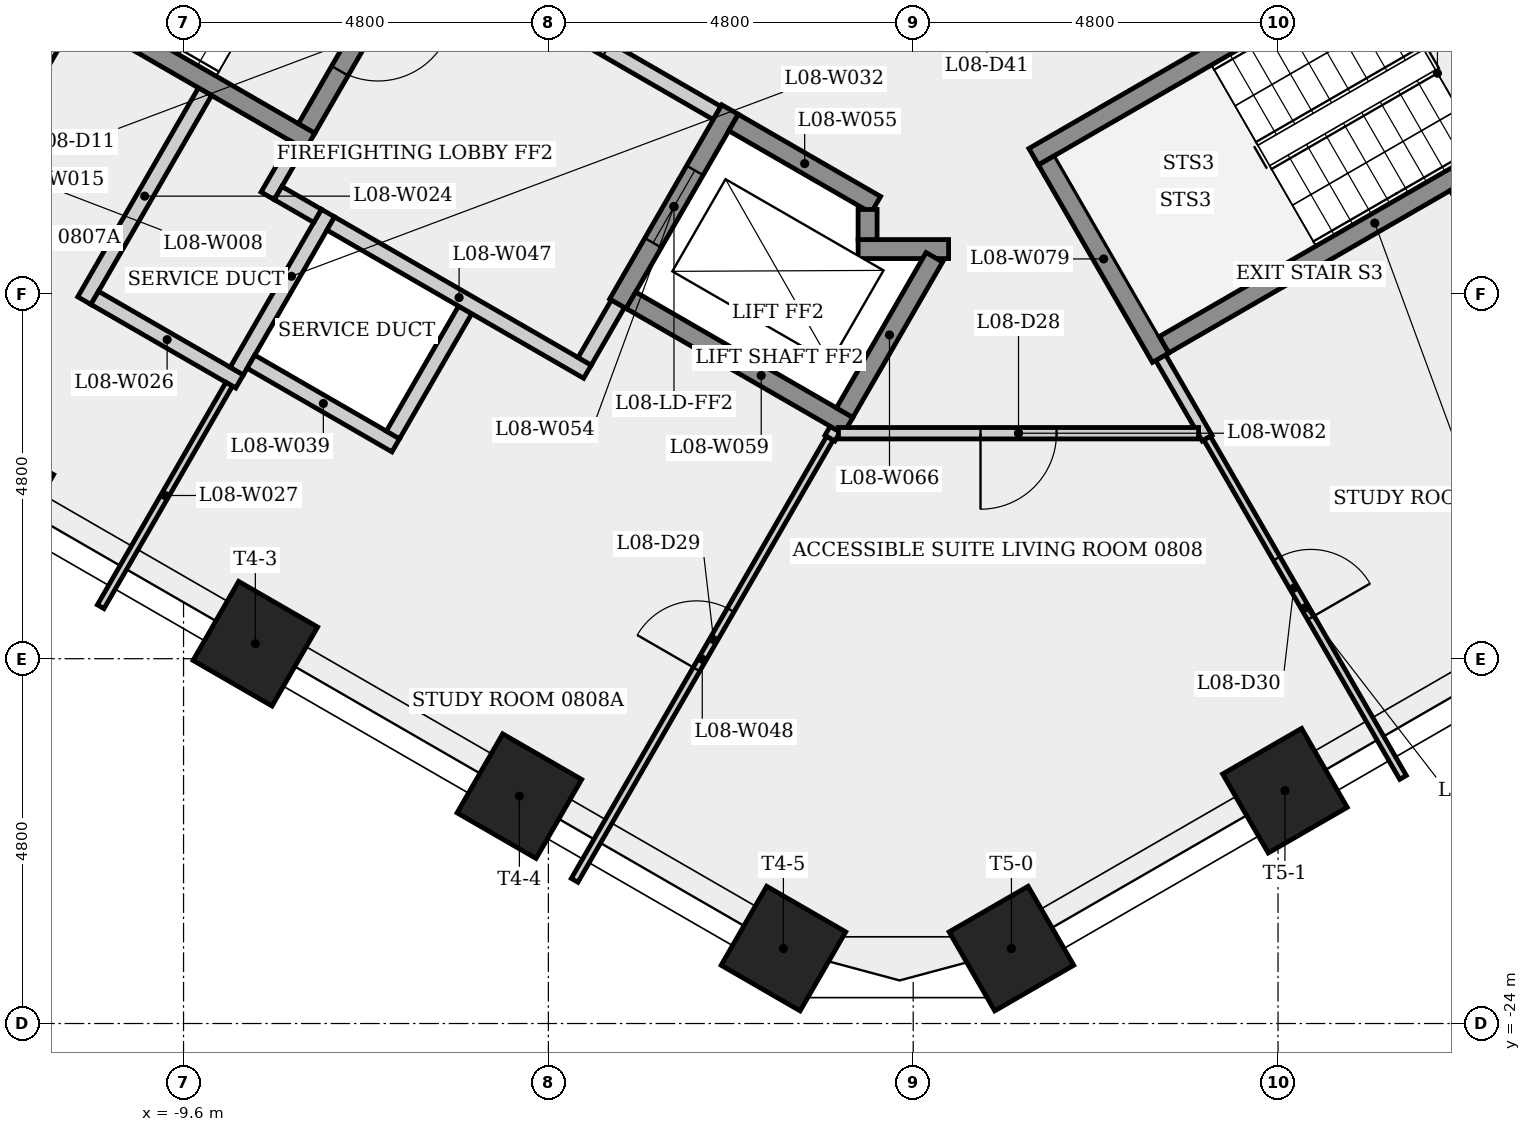
"""IFC4 building model, lengths in metres.
Left out: names, types, materials, properties, quantities, classifications, styles, units other than length and angle.
Written with IfcOpenShell. Run it as: python <this file> out.ifc"""

import sys

from ifc_helpers import new_model, si_unit, direction, frame, frame_2d, origin, origin_2d, place, context, subcontext, project, spatial, rectangle, extrude, element, fill, save


model = new_model("IFC4")
c1 = context("Model", 3, precision=1e-05, world=origin(), true_north=direction((0.0, 1.0)))
c2 = subcontext(c1, "Body", "Model", "MODEL_VIEW")
j1 = project(units=[si_unit("LENGTHUNIT", "METRE"), si_unit("PLANEANGLEUNIT", "RADIAN")], contexts=[c1])
p1 = place(None, origin())
s1 = spatial("IfcSite", under=j1, at=p1, CompositionType="ELEMENT")
p2 = place(p1, origin())
s2 = spatial("IfcBuilding", under=s1, at=p2, CompositionType="ELEMENT")
p3 = place(p2, frame((0.0, 0.0, 35.7)))
s3 = spatial("IfcBuildingStorey", under=s2, at=p3, CompositionType="ELEMENT", Elevation=35.7)
for number, where, z_axis, x_axis in (
    (1, (-12.129, -16.997, 0.0), (0.0, 0.0, 1.0), (-0.5, -0.866, 0.0)),
    (2, (-8.655, -19.003, 0.0), (0.0, 0.0, 1.0), (-0.5, -0.866, 0.0)),
    (3, (-5.182, -21.009, 0.0), (0.0, 0.0, 1.0), (-0.5, -0.866, 0.0)),
    (4, (-1.708, -23.014, 0.0), (0.0, 0.0, 1.0), (-0.5, -0.866, 0.0)),
    (5, (1.292, -23.014, 0.0), (0.0, 0.0, 1.0), (0.5, -0.866, 0.0)),
    (6, (4.891, -20.937, 0.0), (0.0, 0.0, 1.0), (0.5, -0.866, 0.0)),
):
    element("IfcColumn", number, at=place(p3, frame(where, z_axis=z_axis, x_axis=x_axis)), inside=s3, PredefinedType="COLUMN", context=c2, shape_type="SweptSolid", body=[
        extrude(rectangle(XDim=1.2, YDim=1.2, at=origin_2d()), origin(), (0.0, 0.0, 1.0), 3.4),
    ])
p4 = place(p3, frame((-12.262, -12.839, 0.0), z_axis=(0.0, 0.0, 1.0), x_axis=(0.499972286653, 0.866041403502, 0.0)))
e7 = element("IfcWall", 7, at=p4, inside=s3, PredefinedType="PARTITIONING", context=c2, shape_type="SweptSolid", body=[
    extrude(rectangle(XDim=2.425, YDim=0.1, at=frame_2d((1.212, 0.0))), origin(), (0.0, 0.0, 1.0), 3.05),
])
p5 = place(p3, frame((-13.477, -9.193, 0.0), z_axis=(0.0, 0.0, 1.0), x_axis=(0.866025499775, -0.499999833739, 0.0)))
e8 = element("IfcWall", 8, at=p5, inside=s3, PredefinedType="SHEAR", context=c2, shape_type="SweptSolid", body=[
    extrude(rectangle(XDim=6.4, YDim=0.25, at=frame_2d((3.2, 0.0))), origin(), (0.0, 0.0, 1.0), 3.05),
])
p6 = place(p3, frame((-10.905, -14.489, 0.0), z_axis=(0.0, 0.0, 1.0), x_axis=(0.499959856469, 0.866048579423, 0.0)))
e9 = element("IfcWall", 9, at=p6, inside=s3, PredefinedType="PLUMBINGWALL", context=c2, shape_type="SweptSolid", body=[
    extrude(rectangle(XDim=3.175, YDim=0.2, at=frame_2d((1.587, 0.0))), origin(), (0.0, 0.0, 1.0), 3.05),
])
p7 = place(p3, frame((-8.863, -15.552, 0.0), z_axis=(0.0, 0.0, 1.0), x_axis=(-0.866035918664, 0.499981787252, 0.0)))
e10 = element("IfcWall", 10, at=p7, inside=s3, PredefinedType="PLUMBINGWALL", context=c2, shape_type="SweptSolid", body=[
    extrude(rectangle(XDim=2.2, YDim=0.2, at=frame_2d((1.1, 0.0))), origin(), (0.0, 0.0, 1.0), 3.05),
])
p8 = place(p3, frame((-9.0, -15.588, 0.0), z_axis=(0.0, 0.0, 1.0), x_axis=(-0.499968344795, -0.866043679154, 0.0)))
e11 = element("IfcWall", 11, at=p8, inside=s3, PredefinedType="PARTITIONING", context=c2, shape_type="SweptSolid", body=[
    extrude(rectangle(XDim=3.381, YDim=0.1, at=frame_2d((1.69, 0.0))), origin(), (0.0, 0.0, 1.0), 3.05),
])
p9 = place(p3, frame((-8.493, -13.11, 0.0), z_axis=(0.0, 0.0, 1.0), x_axis=(0.500067724834, 0.865986299303, 0.0)))
e12 = element("IfcWall", 12, at=p9, inside=s3, PredefinedType="PLUMBINGWALL", context=c2, shape_type="SweptSolid", body=[
    extrude(rectangle(XDim=0.775, YDim=0.2, at=frame_2d((0.388, 0.0))), origin(), (0.0, 0.0, 1.0), 3.05),
])
p10 = place(p3, frame((-7.7, -13.337, 0.0), z_axis=(0.0, 0.0, 1.0), x_axis=(-0.500001309137, -0.866024647952, 0.0)))
e13 = element("IfcWall", 13, at=p10, inside=s3, PredefinedType="PLUMBINGWALL", context=c2, shape_type="SweptSolid", body=[
    extrude(rectangle(XDim=2.4, YDim=0.2, at=frame_2d((1.2, 0.0))), origin(), (0.0, 0.0, 1.0), 3.05),
])
p11 = place(p3, frame((-7.836, -13.373, 0.0), z_axis=(0.0, 0.0, 1.0), x_axis=(-0.866232998003, 0.499640263761, 0.0)))
e14 = element("IfcWall", 14, at=p11, inside=s3, PredefinedType="PLUMBINGWALL", context=c2, shape_type="SweptSolid", body=[
    extrude(rectangle(XDim=0.6, YDim=0.2, at=frame_2d((0.3, 0.0))), origin(), (0.0, 0.0, 1.0), 3.05),
])
p12 = place(p3, frame((-6.808, -16.392, 0.0), z_axis=(0.0, 0.0, 1.0), x_axis=(-0.866008176907, 0.50002983664, 0.0)))
e15 = element("IfcWall", 15, at=p12, inside=s3, PredefinedType="PLUMBINGWALL", context=c2, shape_type="SweptSolid", body=[
    extrude(rectangle(XDim=2.2, YDim=0.2, at=frame_2d((1.1, 0.0))), origin(), (0.0, 0.0, 1.0), 3.05),
])
p13 = place(p3, frame((-6.605, -9.841, 0.0), z_axis=(0.0, 0.0, 1.0), x_axis=(-0.499996545922, -0.866027397988, 0.0)))
e16 = element("IfcWall", 16, at=p13, inside=s3, PredefinedType="SHEAR", context=c2, shape_type="SweptSolid", body=[
    extrude(rectangle(XDim=2.75, YDim=0.25, at=frame_2d((1.375, 0.0))), origin(), (0.0, 0.0, 1.0), 3.05),
])
p14 = place(p13, frame((0.875, 0.0, 0.0)))
e17 = element("IfcOpeningElement", 17, at=p14, cuts=e16, PredefinedType="OPENING", context=c2, shape_type="SweptSolid", body=[
    extrude(rectangle(XDim=1.0, YDim=2.1, at=frame_2d((0.5, 1.05))), frame((0.0, 0.135, 0.0), z_axis=(0.0, -1.0, 0.0), x_axis=(1.0, 0.0, 0.0)), (0.0, 0.0, 1.0), 0.27),
])
p15 = place(p3, frame((-6.435, -9.795, 0.0), z_axis=(0.0, 0.0, 1.0), x_axis=(0.866012907634, -0.500021643343, 0.0)))
e18 = element("IfcWall", 18, at=p15, inside=s3, PredefinedType="PARTITIONING", context=c2, shape_type="SweptSolid", body=[
    extrude(rectangle(XDim=4.45, YDim=0.2, at=frame_2d((2.225, 0.0))), origin(), (0.0, 0.0, 1.0), 3.05),
])
p16 = place(p15, frame((1.675, 0.0, 0.0)))
e19 = element("IfcOpeningElement", 19, at=p16, cuts=e18, PredefinedType="OPENING", context=c2, shape_type="SweptSolid", body=[
    extrude(rectangle(XDim=1.1, YDim=2.1, at=frame_2d((0.55, 1.05))), frame((0.0, 0.11, 0.0), z_axis=(0.0, -1.0, 0.0), x_axis=(1.0, 0.0, 0.0)), (0.0, 0.0, 1.0), 0.22),
])
p17 = place(p3, frame((-5.895, -14.61, 0.0), z_axis=(0.0, 0.0, 1.0), x_axis=(-0.500022797313, -0.86601224135, 0.0)))
e20 = element("IfcWall", 20, at=p17, inside=s3, PredefinedType="PLUMBINGWALL", context=c2, shape_type="SweptSolid", body=[
    extrude(rectangle(XDim=1.9, YDim=0.2, at=frame_2d((0.95, 0.0))), origin(), (0.0, 0.0, 1.0), 3.05),
])
p18 = place(p3, frame((-4.286, -15.423, 0.0), z_axis=(0.0, 0.0, 1.0), x_axis=(-0.866042777325, 0.499969906938, 0.0)))
e21 = element("IfcWall", 21, at=p18, inside=s3, PredefinedType="PARTITIONING", context=c2, shape_type="SweptSolid", body=[
    extrude(rectangle(XDim=3.9, YDim=0.2, at=frame_2d((1.95, 0.0))), origin(), (0.0, 0.0, 1.0), 3.05),
])
p19 = place(p3, frame((-4.455, -22.116, 0.0), z_axis=(0.0, 0.0, 1.0), x_axis=(0.500004517121, 0.866022795808, 0.0)))
e22 = element("IfcWall", 22, at=p19, inside=s3, PredefinedType="PARTITIONING", context=c2, shape_type="SweptSolid", body=[
    extrude(rectangle(XDim=6.718, YDim=0.1, at=frame_2d((3.359, 0.0))), origin(), (0.0, 0.0, 1.0), 3.05),
])
p20 = place(p19, frame((3.207, 0.0, 0.0)))
e23 = element("IfcOpeningElement", 23, at=p20, cuts=e22, PredefinedType="OPENING", context=c2, shape_type="SweptSolid", body=[
    extrude(rectangle(XDim=0.9, YDim=2.1, at=frame_2d((0.45, 1.05))), frame((0.0, 0.06, 0.0), z_axis=(0.0, -1.0, 0.0), x_axis=(1.0, 0.0, 0.0)), (0.0, 0.0, 1.0), 0.12),
])
p21 = place(p3, frame((-3.885, -14.529, 0.0), z_axis=(0.0, 0.0, 1.0), x_axis=(-0.499859285417, -0.866106630146, 0.0)))
e24 = element("IfcWall", 24, at=p21, inside=s3, PredefinedType="PARTITIONING", context=c2, shape_type="SweptSolid", body=[
    extrude(rectangle(XDim=0.875, YDim=0.2, at=frame_2d((0.438, 0.0))), origin(), (0.0, 0.0, 1.0), 3.05),
])
p22 = place(p3, frame((-2.41, -11.974, 0.0), z_axis=(0.0, 0.0, 1.0), x_axis=(-0.500001826776, -0.866024349092, 0.0)))
e25 = element("IfcWall", 25, at=p22, inside=s3, PredefinedType="SHEAR", context=c2, shape_type="SweptSolid", body=[
    extrude(rectangle(XDim=2.95, YDim=0.25, at=frame_2d((1.475, 0.0))), origin(), (0.0, 0.0, 1.0), 3.05),
])
p23 = place(p22, frame((0.925, 0.0, 0.0)))
e26 = element("IfcOpeningElement", 26, at=p23, cuts=e25, PredefinedType="OPENING", context=c2, shape_type="SweptSolid", body=[
    extrude(rectangle(XDim=1.1, YDim=2.1, at=frame_2d((0.55, 1.05))), frame((0.0, 0.135, 0.0), z_axis=(0.0, -1.0, 0.0), x_axis=(1.0, 0.0, 0.0)), (0.0, 0.0, 1.0), 0.27),
])
p24 = place(p3, frame((-2.364, -12.145, 0.0), z_axis=(0.0, 0.0, 1.0), x_axis=(0.86603892542, -0.499976579108, 0.0)))
e27 = element("IfcWall", 27, at=p24, inside=s3, PredefinedType="SHEAR", context=c2, shape_type="SweptSolid", body=[
    extrude(rectangle(XDim=2.162, YDim=0.25, at=frame_2d((1.081, 0.0))), origin(), (0.0, 0.0, 1.0), 3.05),
])
p25 = place(p3, frame((-1.096, -16.298, 0.0), z_axis=(0.0, 0.0, 1.0), x_axis=(0.499004859493, 0.866599186592, 0.0)))
e28 = element("IfcWall", 28, at=p25, inside=s3, PredefinedType="PARTITIONING", context=c2, shape_type="SweptSolid", body=[
    extrude(rectangle(XDim=0.137, YDim=0.15, at=frame_2d((0.069, 0.0))), origin(), (0.0, 0.0, 1.0), 3.05),
])
p26 = place(p3, frame((-0.856, -16.133, 0.0), z_axis=(0.0, 0.0, 1.0), x_axis=(-0.866021716278, 0.500006386895, 0.0)))
e29 = element("IfcWall", 29, at=p26, inside=s3, PredefinedType="SHEAR", context=c2, shape_type="SweptSolid", body=[
    extrude(rectangle(XDim=3.3, YDim=0.25, at=frame_2d((1.65, 0.0))), origin(), (0.0, 0.0, 1.0), 3.05),
])
p27 = place(p3, frame((-0.725, -13.81, 0.0), z_axis=(0.0, 0.0, 1.0), x_axis=(1.0, 0.0, 0.0)))
e30 = element("IfcWall", 30, at=p27, inside=s3, PredefinedType="SHEAR", context=c2, shape_type="SweptSolid", body=[
    extrude(rectangle(XDim=1.191, YDim=0.25, at=frame_2d((0.595, 0.0))), origin(), (0.0, 0.0, 1.0), 3.05),
])
p28 = place(p3, frame((-0.6, -13.289, 0.0), z_axis=(0.0, 0.0, 1.0), x_axis=(0.0, -1.0, 0.0)))
e31 = element("IfcWall", 31, at=p28, inside=s3, PredefinedType="SHEAR", context=c2, shape_type="SweptSolid", body=[
    extrude(rectangle(XDim=0.396, YDim=0.25, at=frame_2d((0.198, 0.0))), origin(), (0.0, 0.0, 1.0), 3.4),
])
p29 = place(p3, frame((0.278, -13.918, 0.0), z_axis=(0.0, 0.0, 1.0), x_axis=(-0.49998806882, -0.866032292145, 0.0)))
e32 = element("IfcWall", 32, at=p29, inside=s3, PredefinedType="SHEAR", context=c2, shape_type="SweptSolid", body=[
    extrude(rectangle(XDim=2.36, YDim=0.25, at=frame_2d((1.18, 0.0))), origin(), (0.0, 0.0, 1.0), 3.4),
])
p30 = place(p3, frame((1.585, -12.595, 0.0), z_axis=(0.0, 0.0, 1.0), x_axis=(0.866036417653, 0.499980922934, 0.0)))
e33 = element("IfcWall", 33, at=p30, inside=s3, PredefinedType="SHEAR", context=c2, shape_type="SweptSolid", body=[
    extrude(rectangle(XDim=6.65, YDim=0.25, at=frame_2d((3.325, 0.0))), origin(), (0.0, 0.0, 1.0), 3.05),
])
p31 = place(p30, frame((5.275, 0.0, 0.0)))
e34 = element("IfcOpeningElement", 34, at=p31, cuts=e33, PredefinedType="OPENING", context=c2, shape_type="SweptSolid", body=[
    extrude(rectangle(XDim=1.0, YDim=2.1, at=frame_2d((0.5, 1.05))), frame((0.0, 0.135, 0.0), z_axis=(0.0, -1.0, 0.0), x_axis=(1.0, 0.0, 0.0)), (0.0, 0.0, 1.0), 0.27),
])
p32 = place(p3, frame((3.256, -15.239, 0.0), z_axis=(0.0, 0.0, 1.0), x_axis=(0.499981614633, -0.866036018321, 0.0)))
e35 = element("IfcWall", 35, at=p32, inside=s3, PredefinedType="PARTITIONING", context=c2, shape_type="SweptSolid", body=[
    extrude(rectangle(XDim=1.223, YDim=0.15, at=frame_2d((0.612, 0.0))), origin(), (0.0, 0.0, 1.0), 3.05),
])
p33 = place(p3, frame((3.256, -15.239, 0.0), z_axis=(0.0, 0.0, 1.0), x_axis=(-0.50002537861, 0.866010750942, 0.0)))
e36 = element("IfcWall", 36, at=p33, inside=s3, PredefinedType="SHEAR", context=c2, shape_type="SweptSolid", body=[
    extrude(rectangle(XDim=3.0, YDim=0.25, at=frame_2d((1.5, 0.0))), origin(), (0.0, 0.0, 1.0), 3.05),
])
p34 = place(p3, frame((3.755, -16.233, 0.0), z_axis=(0.0, 0.0, 1.0), x_axis=(-1.0, 0.0, 0.0)))
e37 = element("IfcWall", 37, at=p34, inside=s3, PredefinedType="PARTITIONING", context=c2, shape_type="SweptSolid", body=[
    extrude(rectangle(XDim=4.738, YDim=0.15, at=frame_2d((2.369, 0.0))), origin(), (0.0, 0.0, 1.0), 3.05),
])
p35 = place(p34, frame((1.869, 0.0, 0.0)))
e38 = element("IfcOpeningElement", 38, at=p35, cuts=e37, PredefinedType="OPENING", context=c2, shape_type="SweptSolid", body=[
    extrude(rectangle(XDim=1.0, YDim=2.1, at=frame_2d((0.5, 1.05))), frame((0.0, 0.085, 0.0), z_axis=(0.0, -1.0, 0.0), x_axis=(1.0, 0.0, 0.0)), (0.0, 0.0, 1.0), 0.17),
])
p36 = place(p3, frame((3.867, -16.298, 0.0), z_axis=(0.0, 0.0, 1.0), x_axis=(0.499990325971, -0.866030989016, 0.0)))
e39 = element("IfcWall", 39, at=p36, inside=s3, PredefinedType="PARTITIONING", context=c2, shape_type="SweptSolid", body=[
    extrude(rectangle(XDim=5.154, YDim=0.1, at=frame_2d((2.577, 0.0))), origin(), (0.0, 0.0, 1.0), 3.05),
])
p37 = place(p36, frame((1.829, 0.0, 0.0)))
e40 = element("IfcOpeningElement", 40, at=p37, cuts=e39, PredefinedType="OPENING", context=c2, shape_type="SweptSolid", body=[
    extrude(rectangle(XDim=0.9, YDim=2.1, at=frame_2d((0.45, 1.05))), frame((0.0, 0.06, 0.0), z_axis=(0.0, -1.0, 0.0), x_axis=(1.0, 0.0, 0.0)), (0.0, 0.0, 1.0), 0.12),
])
p38 = place(p3, frame((3.301, -15.068, 0.0), z_axis=(0.0, 0.0, 1.0), x_axis=(0.866035036182, 0.499983315828, 0.0)))
e41 = element("IfcWall", 41, at=p38, inside=s3, PredefinedType="SHEAR", context=c2, shape_type="SweptSolid", body=[
    extrude(rectangle(XDim=6.4, YDim=0.25, at=frame_2d((3.2, 0.0))), origin(), (0.0, 0.0, 1.0), 3.05),
])
p39 = place(p3, frame((8.74, -15.739, 0.0), z_axis=(0.0, 0.0, 1.0), x_axis=(-0.500017526161, 0.866015284814, 0.0)))
e42 = element("IfcWall", 42, at=p39, inside=s3, PredefinedType="PLUMBINGWALL", context=c2, shape_type="SweptSolid", body=[
    extrude(rectangle(XDim=3.175, YDim=0.2, at=frame_2d((1.588, 0.0))), origin(), (0.0, 0.0, 1.0), 3.05),
])
p40 = place(p14, origin())
e43 = element("IfcDoor", 43, at=p40, inside=s3, OperationType="SINGLE_SWING_LEFT", PredefinedType="DOOR", context=c2, shape_type="SweptSolid", body=[
    extrude(rectangle(XDim=1.0, YDim=2.1, at=frame_2d((0.5, 1.05))), frame((0.0, 0.025, 0.0), z_axis=(0.0, -1.0, 0.0), x_axis=(1.0, 0.0, 0.0)), (0.0, 0.0, 1.0), 0.05),
])
fill(e17, e43)
p41 = place(p23, origin())
e44 = element("IfcDoor", 44, at=p41, inside=s3, OperationType="SLIDING_TO_LEFT", PredefinedType="DOOR", context=c2, shape_type="SweptSolid", body=[
    extrude(rectangle(XDim=1.1, YDim=2.1, at=frame_2d((0.55, 1.05))), frame((0.0, 0.025, 0.0), z_axis=(0.0, -1.0, 0.0), x_axis=(1.0, 0.0, 0.0)), (0.0, 0.0, 1.0), 0.05),
])
fill(e26, e44)
p42 = place(p35, origin())
e45 = element("IfcDoor", 45, at=p42, inside=s3, OperationType="SINGLE_SWING_RIGHT", PredefinedType="DOOR", context=c2, shape_type="SweptSolid", body=[
    extrude(rectangle(XDim=1.0, YDim=2.1, at=frame_2d((0.5, 1.05))), frame((0.0, 0.025, 0.0), z_axis=(0.0, -1.0, 0.0), x_axis=(1.0, 0.0, 0.0)), (0.0, 0.0, 1.0), 0.05),
])
fill(e38, e45)
p43 = place(p20, origin())
e46 = element("IfcDoor", 46, at=p43, inside=s3, OperationType="SINGLE_SWING_LEFT", PredefinedType="DOOR", context=c2, shape_type="SweptSolid", body=[
    extrude(rectangle(XDim=0.9, YDim=2.1, at=frame_2d((0.45, 1.05))), frame((0.0, 0.025, 0.0), z_axis=(0.0, -1.0, 0.0), x_axis=(1.0, 0.0, 0.0)), (0.0, 0.0, 1.0), 0.05),
])
fill(e23, e46)
p44 = place(p37, origin())
e47 = element("IfcDoor", 47, at=p44, inside=s3, OperationType="SINGLE_SWING_RIGHT", PredefinedType="DOOR", context=c2, shape_type="SweptSolid", body=[
    extrude(rectangle(XDim=0.9, YDim=2.1, at=frame_2d((0.45, 1.05))), frame((0.0, 0.025, 0.0), z_axis=(0.0, -1.0, 0.0), x_axis=(1.0, 0.0, 0.0)), (0.0, 0.0, 1.0), 0.05),
])
fill(e40, e47)
save(model, sys.argv[1])
